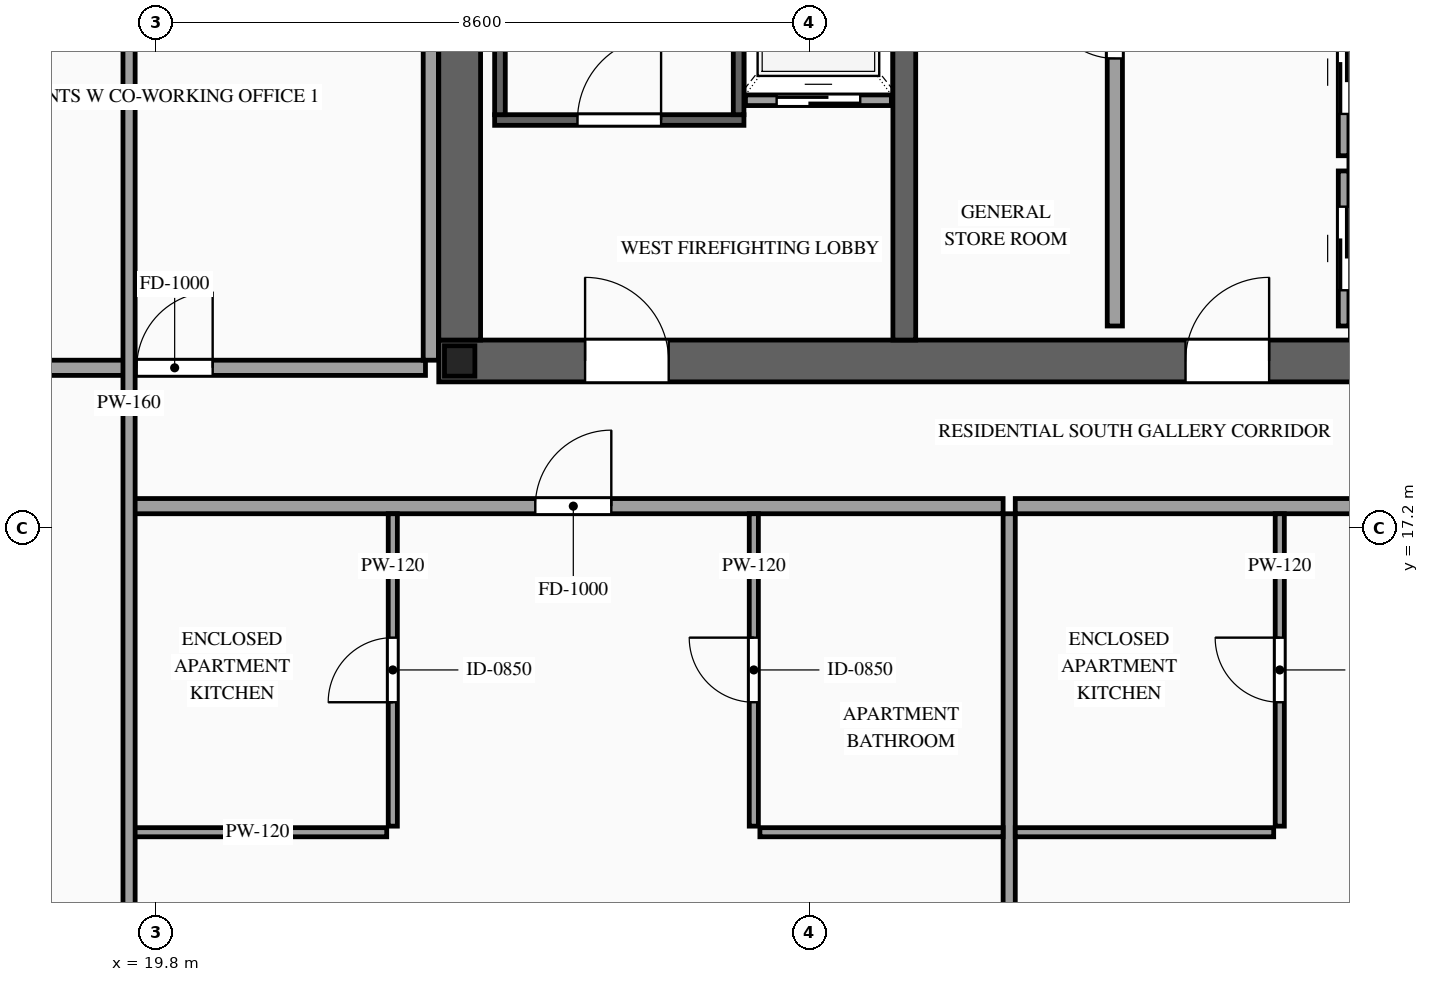
"""IFC4 building model, lengths in metres.
Left out: names, types, materials, properties, quantities, classifications, styles, units other than length and angle.
Written with IfcOpenShell. Run it as: python <this file> out.ifc"""

import sys

from ifc_helpers import new_model, si_unit, direction, frame, frame_2d, origin, origin_2d, place, context, subcontext, project, spatial, rectangle, i_section, extrude, source, transform, mapped, element, fill, save


model = new_model("IFC4")
c1 = context("Model", 3, precision=1e-05, world=origin(), true_north=direction((0.0, 1.0)))
c2 = subcontext(c1, "Body", "Model", "MODEL_VIEW")
j1 = project(units=[si_unit("LENGTHUNIT", "METRE"), si_unit("PLANEANGLEUNIT", "RADIAN")], contexts=[c1])
p1 = place(None, origin())
s1 = spatial("IfcSite", under=j1, at=p1, CompositionType="ELEMENT")
p2 = place(p1, origin())
s2 = spatial("IfcBuilding", under=s1, at=p2, CompositionType="ELEMENT")
p3 = place(p2, frame((0.0, 0.0, 238.1)))
s3 = spatial("IfcBuildingStorey", under=s2, at=p3, CompositionType="ELEMENT", Elevation=238.1)
p4 = place(p3, frame((23.525, 19.4, 0.0), z_axis=(0.0, 0.0, 1.0), x_axis=(1.0, 0.0, 0.0)))
e1 = element("IfcWall", 1, at=p4, inside=s3, PredefinedType="SHEAR", context=c2, shape_type="SweptSolid", body=[
    extrude(rectangle(XDim=26.95, YDim=0.55, at=frame_2d((13.475, 0.0))), origin(), (0.0, 0.0, 1.0), 3.5),
])
p5 = place(p4, frame((1.925, 0.0, 0.0)))
e2 = element("IfcOpeningElement", 2, at=p5, cuts=e1, PredefinedType="OPENING", context=c2, shape_type="SweptSolid", body=[
    extrude(rectangle(XDim=1.1, YDim=2.2, at=frame_2d((0.55, 1.1))), frame((0.0, 0.29, 0.0), z_axis=(0.0, -1.0, 0.0), x_axis=(1.0, 0.0, 0.0)), (0.0, 0.0, 1.0), 0.58),
])
p6 = place(p4, frame((9.825, 0.0, 0.0)))
e3 = element("IfcOpeningElement", 3, at=p6, cuts=e1, PredefinedType="OPENING", context=c2, shape_type="SweptSolid", body=[
    extrude(rectangle(XDim=1.1, YDim=2.2, at=frame_2d((0.55, 1.1))), frame((0.0, 0.29, 0.0), z_axis=(0.0, -1.0, 0.0), x_axis=(1.0, 0.0, 0.0)), (0.0, 0.0, 1.0), 0.58),
])
p7 = place(p4, frame((23.025, 0.0, 0.0)))
e4 = element("IfcOpeningElement", 4, at=p7, cuts=e1, PredefinedType="OPENING", context=c2, shape_type="SweptSolid", body=[
    extrude(rectangle(XDim=1.1, YDim=2.2, at=frame_2d((0.55, 1.1))), frame((0.0, 0.29, 0.0), z_axis=(0.0, -1.0, 0.0), x_axis=(1.0, 0.0, 0.0)), (0.0, 0.0, 1.0), 0.58),
])
p8 = place(p4, frame((19.645, 0.0, 0.0)))
e5 = element("IfcOpeningElement", 5, at=p8, cuts=e1, PredefinedType="OPENING", context=c2, shape_type="SweptSolid", body=[
    extrude(rectangle(XDim=0.9, YDim=2.15, at=frame_2d((0.45, 1.075))), frame((0.0, 0.29, 0.0), z_axis=(0.0, -1.0, 0.0), x_axis=(1.0, 0.0, 0.0)), (0.0, 0.0, 1.0), 0.58),
])
p9 = place(p4, frame((18.205, 0.0, 0.0)))
e6 = element("IfcOpeningElement", 6, at=p9, cuts=e1, PredefinedType="OPENING", context=c2, shape_type="SweptSolid", body=[
    extrude(rectangle(XDim=0.9, YDim=2.15, at=frame_2d((0.45, 1.075))), frame((0.0, 0.29, 0.0), z_axis=(0.0, -1.0, 0.0), x_axis=(1.0, 0.0, 0.0)), (0.0, 0.0, 1.0), 0.58),
])
m1 = source(origin(), c2, "Body", "SweptSolid", [
    extrude(rectangle(XDim=12.25, YDim=0.55, at=frame_2d((6.125, 0.0))), origin(), (0.0, 0.0, 1.0), 3.5),
])
p10 = place(p3, frame((23.8, 19.675, 0.0), z_axis=(0.0, 0.0, 1.0), x_axis=(0.0, 1.0, 0.0)))
e7 = element("IfcWall", 7, at=p10, inside=s3, PredefinedType="SHEAR", context=c2, shape_type="MappedRepresentation", body=[
    mapped(m1, transform((0.0, 0.0, 0.0), scale=1.0)),
])
m2 = source(origin(), c2, "Body", "SweptSolid", [
    extrude(rectangle(XDim=12.25, YDim=0.3, at=frame_2d((6.125, 0.0))), origin(), (0.0, 0.0, 1.0), 3.5),
])
p11 = place(p3, frame((29.65, 19.675, 0.0), z_axis=(0.0, 0.0, 1.0), x_axis=(0.0, 1.0, 0.0)))
e8 = element("IfcWall", 8, at=p11, inside=s3, PredefinedType="SOLIDWALL", context=c2, shape_type="MappedRepresentation", body=[
    mapped(m2, transform((0.0, 0.0, 0.0), scale=1.0)),
])
m3 = source(origin(), c2, "Body", "SweptSolid", [
    extrude(i_section(OverallWidth=0.4, OverallDepth=0.4, WebThickness=0.013, FlangeThickness=0.021, at=origin_2d()), origin(), (0.0, 0.0, 1.0), 3.5),
])
p12 = place(p3, frame((23.8, 19.4, 0.0), z_axis=(0.0, 0.0, 1.0), x_axis=(1.0, 0.0, 0.0)))
e9 = element("IfcColumn", 9, at=p12, inside=s3, PredefinedType="COLUMN", context=c2, shape_type="MappedRepresentation", body=[
    mapped(m3, transform((0.0, 0.0, 0.0), scale=1.0)),
])
p13 = place(p3, frame((27.56, 22.83, 0.0), z_axis=(0.0, 0.0, 1.0), x_axis=(1.0, 0.0, 0.0)))
e10 = element("IfcWall", 10, at=p13, inside=s3, PredefinedType="SOLIDWALL", context=c2, shape_type="SweptSolid", body=[
    extrude(rectangle(XDim=1.92, YDim=0.14, at=frame_2d((0.96, 0.0))), origin(), (0.0, 0.0, 1.0), 3.28),
])
p14 = place(p13, frame((0.41, 0.0, 0.0)))
e11 = element("IfcOpeningElement", 11, at=p14, cuts=e10, PredefinedType="OPENING", context=c2, shape_type="SweptSolid", body=[
    extrude(rectangle(XDim=1.1, YDim=2.2, at=frame_2d((0.55, 1.1))), frame((0.0, 0.085, 0.0), z_axis=(0.0, -1.0, 0.0), x_axis=(1.0, 0.0, 0.0)), (0.0, 0.0, 1.0), 0.17),
])
p15 = place(p3, frame((35.43, 19.86, 0.0), z_axis=(0.0, 0.0, 1.0), x_axis=(0.0, 1.0, 0.0)))
e12 = element("IfcWall", 12, at=p15, inside=s3, PredefinedType="SOLIDWALL", context=c2, shape_type="SweptSolid", body=[
    extrude(rectangle(XDim=2.04, YDim=0.14, at=frame_2d((1.02, 0.0))), origin(), (0.0, 0.0, 1.0), 3.28),
])
p16 = place(p15, frame((0.47, 0.0, 0.0)))
e13 = element("IfcOpeningElement", 13, at=p16, cuts=e12, PredefinedType="OPENING", context=c2, shape_type="SweptSolid", body=[
    extrude(rectangle(XDim=1.1, YDim=2.2, at=frame_2d((0.55, 1.1))), frame((0.0, 0.085, 0.0), z_axis=(0.0, -1.0, 0.0), x_axis=(1.0, 0.0, 0.0)), (0.0, 0.0, 1.0), 0.17),
])
m4 = source(origin(), c2, "Body", "SweptSolid", [
    extrude(rectangle(XDim=2.4, YDim=0.14, at=frame_2d((1.2, 0.0))), origin(), (0.0, 0.0, 1.0), 3.28),
])
p17 = place(p3, frame((35.5, 22.0, 0.0), z_axis=(0.0, 0.0, 1.0), x_axis=(1.0, 0.0, 0.0)))
e14 = element("IfcWall", 14, at=p17, inside=s3, PredefinedType="SOLIDWALL", context=c2, shape_type="MappedRepresentation", body=[
    mapped(m4, transform((0.0, 0.0, 0.0), scale=1.0)),
])
p18 = place(p3, frame((35.43, 22.1, 0.0), z_axis=(0.0, 0.0, 1.0), x_axis=(0.0, 1.0, 0.0)))
e15 = element("IfcWall", 15, at=p18, inside=s3, PredefinedType="SOLIDWALL", context=c2, shape_type="SweptSolid", body=[
    extrude(rectangle(XDim=2.2, YDim=0.14, at=frame_2d((1.1, 0.0))), origin(), (0.0, 0.0, 1.0), 3.28),
])
p19 = place(p18, frame((0.55, 0.0, 0.0)))
e16 = element("IfcOpeningElement", 16, at=p19, cuts=e15, PredefinedType="OPENING", context=c2, shape_type="SweptSolid", body=[
    extrude(rectangle(XDim=1.1, YDim=2.2, at=frame_2d((0.55, 1.1))), frame((0.0, 0.085, 0.0), z_axis=(0.0, -1.0, 0.0), x_axis=(1.0, 0.0, 0.0)), (0.0, 0.0, 1.0), 0.17),
])
p20 = place(p3, frame((24.26, 22.57, 0.0), z_axis=(0.0, 0.0, 1.0), x_axis=(1.0, 0.0, 0.0)))
e17 = element("IfcWall", 17, at=p20, inside=s3, PredefinedType="SOLIDWALL", context=c2, shape_type="SweptSolid", body=[
    extrude(rectangle(XDim=3.28, YDim=0.14, at=frame_2d((1.64, 0.0))), origin(), (0.0, 0.0, 1.0), 3.28),
])
p21 = place(p20, frame((1.09, 0.0, 0.0)))
e18 = element("IfcOpeningElement", 18, at=p21, cuts=e17, PredefinedType="OPENING", context=c2, shape_type="SweptSolid", body=[
    extrude(rectangle(XDim=1.1, YDim=2.2, at=frame_2d((0.55, 1.1))), frame((0.0, 0.085, 0.0), z_axis=(0.0, -1.0, 0.0), x_axis=(1.0, 0.0, 0.0)), (0.0, 0.0, 1.0), 0.17),
])
m5 = source(origin(), c2, "Body", "SweptSolid", [
    extrude(rectangle(XDim=8.94, YDim=0.14, at=frame_2d((4.47, 0.0))), origin(), (0.0, 0.0, 1.0), 3.28),
])
for number, where, z_axis, x_axis in (
    (19, (24.33, 22.64, 0.0), (0.0, 0.0, 1.0), (0.0, 1.0, 0.0)),
    (20, (27.47, 22.64, 0.0), (0.0, 0.0, 1.0), (0.0, 1.0, 0.0)),
):
    element("IfcWall", number, at=place(p3, frame(where, z_axis=z_axis, x_axis=x_axis)), inside=s3, PredefinedType="SOLIDWALL", context=c2, shape_type="MappedRepresentation", body=[
        mapped(m5, transform((0.0, 0.0, 0.0), scale=1.0)),
    ])
p22 = place(p3, frame((32.42, 19.86, 0.0), z_axis=(0.0, 0.0, 1.0), x_axis=(0.0, 1.0, 0.0)))
e21 = element("IfcWall", 21, at=p22, inside=s3, PredefinedType="PARTITIONING", context=c2, shape_type="SweptSolid", body=[
    extrude(rectangle(XDim=7.94, YDim=0.2, at=frame_2d((3.97, 0.0))), origin(), (0.0, 0.0, 1.0), 3.28),
])
p23 = place(p22, frame((3.52, 0.0, 0.0)))
e22 = element("IfcOpeningElement", 22, at=p23, cuts=e21, PredefinedType="OPENING", context=c2, shape_type="SweptSolid", body=[
    extrude(rectangle(XDim=0.9, YDim=2.15, at=frame_2d((0.45, 1.075))), frame((0.0, 0.115, 0.0), z_axis=(0.0, -1.0, 0.0), x_axis=(1.0, 0.0, 0.0)), (0.0, 0.0, 1.0), 0.23),
])
p24 = place(p3, frame((19.44, 17.49, 0.0), z_axis=(0.0, 0.0, 1.0), x_axis=(1.0, 0.0, 0.0)))
e23 = element("IfcWall", 23, at=p24, inside=s3, PredefinedType="PARTITIONING", context=c2, shape_type="SweptSolid", body=[
    extrude(rectangle(XDim=11.51, YDim=0.2, at=frame_2d((5.755, 0.0))), origin(), (0.0, 0.0, 1.0), 3.28),
])
p25 = place(p24, frame((5.355, 0.0, 0.0)))
e24 = element("IfcOpeningElement", 24, at=p25, cuts=e23, PredefinedType="OPENING", context=c2, shape_type="SweptSolid", body=[
    extrude(rectangle(XDim=1.0, YDim=2.2, at=frame_2d((0.5, 1.1))), frame((0.0, 0.115, 0.0), z_axis=(0.0, -1.0, 0.0), x_axis=(1.0, 0.0, 0.0)), (0.0, 0.0, 1.0), 0.23),
])
m6 = source(origin(), c2, "Body", "SweptSolid", [
    extrude(rectangle(XDim=12.04, YDim=0.16, at=frame_2d((6.02, 0.0))), origin(), (0.0, 0.0, 1.0), 3.28),
])
p26 = place(p3, frame((31.03, 5.35, 0.0), z_axis=(0.0, 0.0, 1.0), x_axis=(0.0, 1.0, 0.0)))
e25 = element("IfcWall", 25, at=p26, inside=s3, PredefinedType="PARTITIONING", context=c2, shape_type="MappedRepresentation", body=[
    mapped(m6, transform((0.0, 0.0, 0.0), scale=1.0)),
])
m7 = source(origin(), c2, "Body", "SweptSolid", [
    extrude(rectangle(XDim=3.4, YDim=0.12, at=frame_2d((1.7, 0.0))), origin(), (0.0, 0.0, 1.0), 3.28),
])
p27 = place(p3, frame((19.44, 13.2, 0.0), z_axis=(0.0, 0.0, 1.0), x_axis=(1.0, 0.0, 0.0)))
e26 = element("IfcWall", 26, at=p27, inside=s3, PredefinedType="PARTITIONING", context=c2, shape_type="MappedRepresentation", body=[
    mapped(m7, transform((0.0, 0.0, 0.0), scale=1.0)),
])
p28 = place(p3, frame((22.92, 13.28, 0.0), z_axis=(0.0, 0.0, 1.0), x_axis=(0.0, 1.0, 0.0)))
e27 = element("IfcWall", 27, at=p28, inside=s3, PredefinedType="PARTITIONING", context=c2, shape_type="SweptSolid", body=[
    extrude(rectangle(XDim=4.11, YDim=0.12, at=frame_2d((2.055, 0.0))), origin(), (0.0, 0.0, 1.0), 3.28),
])
p29 = place(p28, frame((1.63, 0.0, 0.0)))
e28 = element("IfcOpeningElement", 28, at=p29, cuts=e27, PredefinedType="OPENING", context=c2, shape_type="SweptSolid", body=[
    extrude(rectangle(XDim=0.85, YDim=2.1, at=frame_2d((0.425, 1.05))), frame((0.0, 0.075, 0.0), z_axis=(0.0, -1.0, 0.0), x_axis=(1.0, 0.0, 0.0)), (0.0, 0.0, 1.0), 0.15),
])
m8 = source(origin(), c2, "Body", "SweptSolid", [
    extrude(rectangle(XDim=3.2, YDim=0.12, at=frame_2d((1.6, 0.0))), origin(), (0.0, 0.0, 1.0), 3.28),
])
p30 = place(p3, frame((27.75, 13.2, 0.0), z_axis=(0.0, 0.0, 1.0), x_axis=(1.0, 0.0, 0.0)))
e29 = element("IfcWall", 29, at=p30, inside=s3, PredefinedType="PARTITIONING", context=c2, shape_type="MappedRepresentation", body=[
    mapped(m8, transform((0.0, 0.0, 0.0), scale=1.0)),
])
p31 = place(p3, frame((27.67, 13.28, 0.0), z_axis=(0.0, 0.0, 1.0), x_axis=(0.0, 1.0, 0.0)))
e30 = element("IfcWall", 30, at=p31, inside=s3, PredefinedType="PARTITIONING", context=c2, shape_type="SweptSolid", body=[
    extrude(rectangle(XDim=4.11, YDim=0.12, at=frame_2d((2.055, 0.0))), origin(), (0.0, 0.0, 1.0), 3.28),
])
p32 = place(p31, frame((1.63, 0.0, 0.0)))
e31 = element("IfcOpeningElement", 31, at=p32, cuts=e30, PredefinedType="OPENING", context=c2, shape_type="SweptSolid", body=[
    extrude(rectangle(XDim=0.85, YDim=2.1, at=frame_2d((0.425, 1.05))), frame((0.0, 0.075, 0.0), z_axis=(0.0, -1.0, 0.0), x_axis=(1.0, 0.0, 0.0)), (0.0, 0.0, 1.0), 0.15),
])
p33 = place(p3, frame((31.11, 17.49, 0.0), z_axis=(0.0, 0.0, 1.0), x_axis=(1.0, 0.0, 0.0)))
e32 = element("IfcWall", 32, at=p33, inside=s3, PredefinedType="PARTITIONING", context=c2, shape_type="SweptSolid", body=[
    extrude(rectangle(XDim=11.429, YDim=0.2, at=frame_2d((5.714, 0.0))), origin(), (0.0, 0.0, 1.0), 3.28),
])
p34 = place(p33, frame((5.314, 0.0, 0.0)))
e33 = element("IfcOpeningElement", 33, at=p34, cuts=e32, PredefinedType="OPENING", context=c2, shape_type="SweptSolid", body=[
    extrude(rectangle(XDim=1.0, YDim=2.2, at=frame_2d((0.5, 1.1))), frame((0.0, 0.115, 0.0), z_axis=(0.0, -1.0, 0.0), x_axis=(1.0, 0.0, 0.0)), (0.0, 0.0, 1.0), 0.23),
])
m9 = source(origin(), c2, "Body", "SweptSolid", [
    extrude(rectangle(XDim=3.4, YDim=0.12, at=frame_2d((1.7, 0.0))), origin(), (0.0, 0.0, 1.0), 3.28),
])
p35 = place(p3, frame((31.11, 13.2, 0.0), z_axis=(0.0, 0.0, 1.0), x_axis=(1.0, 0.0, 0.0)))
e34 = element("IfcWall", 34, at=p35, inside=s3, PredefinedType="PARTITIONING", context=c2, shape_type="MappedRepresentation", body=[
    mapped(m9, transform((0.0, 0.0, 0.0), scale=1.0)),
])
p36 = place(p3, frame((34.59, 13.28, 0.0), z_axis=(0.0, 0.0, 1.0), x_axis=(0.0, 1.0, 0.0)))
e35 = element("IfcWall", 35, at=p36, inside=s3, PredefinedType="PARTITIONING", context=c2, shape_type="SweptSolid", body=[
    extrude(rectangle(XDim=4.11, YDim=0.12, at=frame_2d((2.055, 0.0))), origin(), (0.0, 0.0, 1.0), 3.28),
])
p37 = place(p36, frame((1.63, 0.0, 0.0)))
e36 = element("IfcOpeningElement", 36, at=p37, cuts=e35, PredefinedType="OPENING", context=c2, shape_type="SweptSolid", body=[
    extrude(rectangle(XDim=0.85, YDim=2.1, at=frame_2d((0.425, 1.05))), frame((0.0, 0.075, 0.0), z_axis=(0.0, -1.0, 0.0), x_axis=(1.0, 0.0, 0.0)), (0.0, 0.0, 1.0), 0.15),
])
p38 = place(p3, frame((16.55, 19.31, 0.0), z_axis=(0.0, 0.0, 1.0), x_axis=(1.0, 0.0, 0.0)))
e37 = element("IfcWall", 37, at=p38, inside=s3, PredefinedType="PARTITIONING", context=c2, shape_type="SweptSolid", body=[
    extrude(rectangle(XDim=6.8, YDim=0.2, at=frame_2d((3.4, 0.0))), origin(), (0.0, 0.0, 1.0), 2.825),
])
p39 = place(p38, frame((3.0, 0.0, 0.0)))
e38 = element("IfcOpeningElement", 38, at=p39, cuts=e37, PredefinedType="OPENING", context=c2, shape_type="SweptSolid", body=[
    extrude(rectangle(XDim=1.0, YDim=2.2, at=frame_2d((0.5, 1.1))), frame((0.0, 0.115, 0.0), z_axis=(0.0, -1.0, 0.0), x_axis=(1.0, 0.0, 0.0)), (0.0, 0.0, 1.0), 0.23),
])
m10 = source(origin(), c2, "Body", "SweptSolid", [
    extrude(rectangle(XDim=6.29, YDim=0.2, at=frame_2d((3.145, 0.0))), origin(), (0.0, 0.0, 1.0), 3.28),
])
p40 = place(p3, frame((23.42, 19.41, 0.0), z_axis=(0.0, 0.0, 1.0), x_axis=(0.0, 1.0, 0.0)))
e39 = element("IfcWall", 39, at=p40, inside=s3, PredefinedType="PARTITIONING", context=c2, shape_type="MappedRepresentation", body=[
    mapped(m10, transform((0.0, 0.0, 0.0), scale=1.0)),
])
m11 = source(origin(), c2, "Body", "SweptSolid", [
    extrude(rectangle(XDim=26.69, YDim=0.16, at=frame_2d((13.345, 0.0))), origin(), (0.0, 0.0, 1.0), 3.28),
])
p41 = place(p3, frame((19.45, 5.5, 0.0), z_axis=(0.0, 0.0, 1.0), x_axis=(0.0, 1.0, 0.0)))
e40 = element("IfcWall", 40, at=p41, inside=s3, PredefinedType="PARTITIONING", context=c2, shape_type="MappedRepresentation", body=[
    mapped(m11, transform((0.0, 0.0, 0.0), scale=1.0)),
])
m12 = source(origin(), c2, "Body", "SweptSolid", [
    extrude(rectangle(XDim=1.1, YDim=2.2, at=frame_2d((0.55, 1.1))), frame((0.0, 0.025, 0.0), z_axis=(0.0, -1.0, 0.0), x_axis=(1.0, 0.0, 0.0)), (0.0, 0.0, 1.0), 0.05),
])
p42 = place(p14, origin())
e41 = element("IfcDoor", 41, at=p42, inside=s3, OperationType="SLIDING_TO_LEFT", PredefinedType="DOOR", context=c2, shape_type="MappedRepresentation", body=[
    mapped(m12, transform((0.0, 0.0, 0.0), scale=1.0)),
])
fill(e11, e41)
p43 = place(p16, origin())
e42 = element("IfcDoor", 42, at=p43, inside=s3, OperationType="SLIDING_TO_RIGHT", PredefinedType="DOOR", context=c2, shape_type="MappedRepresentation", body=[
    mapped(m12, transform((0.0, 0.0, 0.0), scale=1.0)),
])
fill(e13, e42)
p44 = place(p19, origin())
e43 = element("IfcDoor", 43, at=p44, inside=s3, OperationType="SLIDING_TO_LEFT", PredefinedType="DOOR", context=c2, shape_type="MappedRepresentation", body=[
    mapped(m12, transform((0.0, 0.0, 0.0), scale=1.0)),
])
fill(e16, e43)
m13 = source(origin(), c2, "Body", "SweptSolid", [
    extrude(rectangle(XDim=1.1, YDim=2.2, at=frame_2d((0.55, 1.1))), frame((0.0, 0.025, 0.0), z_axis=(0.0, -1.0, 0.0), x_axis=(1.0, 0.0, 0.0)), (0.0, 0.0, 1.0), 0.05),
])
p45 = place(p21, origin())
e44 = element("IfcDoor", 44, at=p45, inside=s3, OperationType="SINGLE_SWING_RIGHT", PredefinedType="DOOR", context=c2, shape_type="MappedRepresentation", body=[
    mapped(m13, transform((0.0, 0.0, 0.0), scale=1.0)),
])
fill(e18, e44)
p46 = place(p5, origin())
e45 = element("IfcDoor", 45, at=p46, inside=s3, OperationType="SINGLE_SWING_LEFT", PredefinedType="DOOR", context=c2, shape_type="MappedRepresentation", body=[
    mapped(m13, transform((0.0, 0.0, 0.0), scale=1.0)),
])
fill(e2, e45)
p47 = place(p6, origin())
e46 = element("IfcDoor", 46, at=p47, inside=s3, OperationType="SINGLE_SWING_RIGHT", PredefinedType="DOOR", context=c2, shape_type="MappedRepresentation", body=[
    mapped(m13, transform((0.0, 0.0, 0.0), scale=1.0)),
])
fill(e3, e46)
m14 = source(origin(), c2, "Body", "SweptSolid", [
    extrude(rectangle(XDim=0.9, YDim=2.15, at=frame_2d((0.45, 1.075))), frame((0.0, 0.025, 0.0), z_axis=(0.0, -1.0, 0.0), x_axis=(1.0, 0.0, 0.0)), (0.0, 0.0, 1.0), 0.05),
])
p48 = place(p23, origin())
e47 = element("IfcDoor", 47, at=p48, inside=s3, OperationType="SINGLE_SWING_RIGHT", PredefinedType="DOOR", context=c2, shape_type="MappedRepresentation", body=[
    mapped(m14, transform((0.0, 0.0, 0.0), scale=1.0)),
])
fill(e22, e47)
m15 = source(origin(), c2, "Body", "SweptSolid", [
    extrude(rectangle(XDim=1.0, YDim=2.2, at=frame_2d((0.5, 1.1))), frame((0.0, 0.025, 0.0), z_axis=(0.0, -1.0, 0.0), x_axis=(1.0, 0.0, 0.0)), (0.0, 0.0, 1.0), 0.05),
])
p49 = place(p25, origin())
e48 = element("IfcDoor", 48, at=p49, inside=s3, OperationType="SINGLE_SWING_RIGHT", PredefinedType="DOOR", context=c2, shape_type="MappedRepresentation", body=[
    mapped(m15, transform((0.0, 0.0, 0.0), scale=1.0)),
])
fill(e24, e48)
m16 = source(origin(), c2, "Body", "SweptSolid", [
    extrude(rectangle(XDim=0.85, YDim=2.1, at=frame_2d((0.425, 1.05))), frame((0.0, 0.025, 0.0), z_axis=(0.0, -1.0, 0.0), x_axis=(1.0, 0.0, 0.0)), (0.0, 0.0, 1.0), 0.05),
])
p50 = place(p29, origin())
e49 = element("IfcDoor", 49, at=p50, inside=s3, OperationType="SINGLE_SWING_LEFT", PredefinedType="DOOR", context=c2, shape_type="MappedRepresentation", body=[
    mapped(m16, transform((0.0, 0.0, 0.0), scale=1.0)),
])
fill(e28, e49)
p51 = place(p32, origin())
e50 = element("IfcDoor", 50, at=p51, inside=s3, OperationType="SINGLE_SWING_RIGHT", PredefinedType="DOOR", context=c2, shape_type="MappedRepresentation", body=[
    mapped(m16, transform((0.0, 0.0, 0.0), scale=1.0)),
])
fill(e31, e50)
p52 = place(p37, origin())
e51 = element("IfcDoor", 51, at=p52, inside=s3, OperationType="SINGLE_SWING_RIGHT", PredefinedType="DOOR", context=c2, shape_type="MappedRepresentation", body=[
    mapped(m16, transform((0.0, 0.0, 0.0), scale=1.0)),
])
fill(e36, e51)
p53 = place(p39, origin())
e52 = element("IfcDoor", 52, at=p53, inside=s3, OperationType="SINGLE_SWING_RIGHT", PredefinedType="DOOR", context=c2, shape_type="MappedRepresentation", body=[
    mapped(m15, transform((0.0, 0.0, 0.0), scale=1.0)),
])
fill(e38, e52)
save(model, sys.argv[1])
